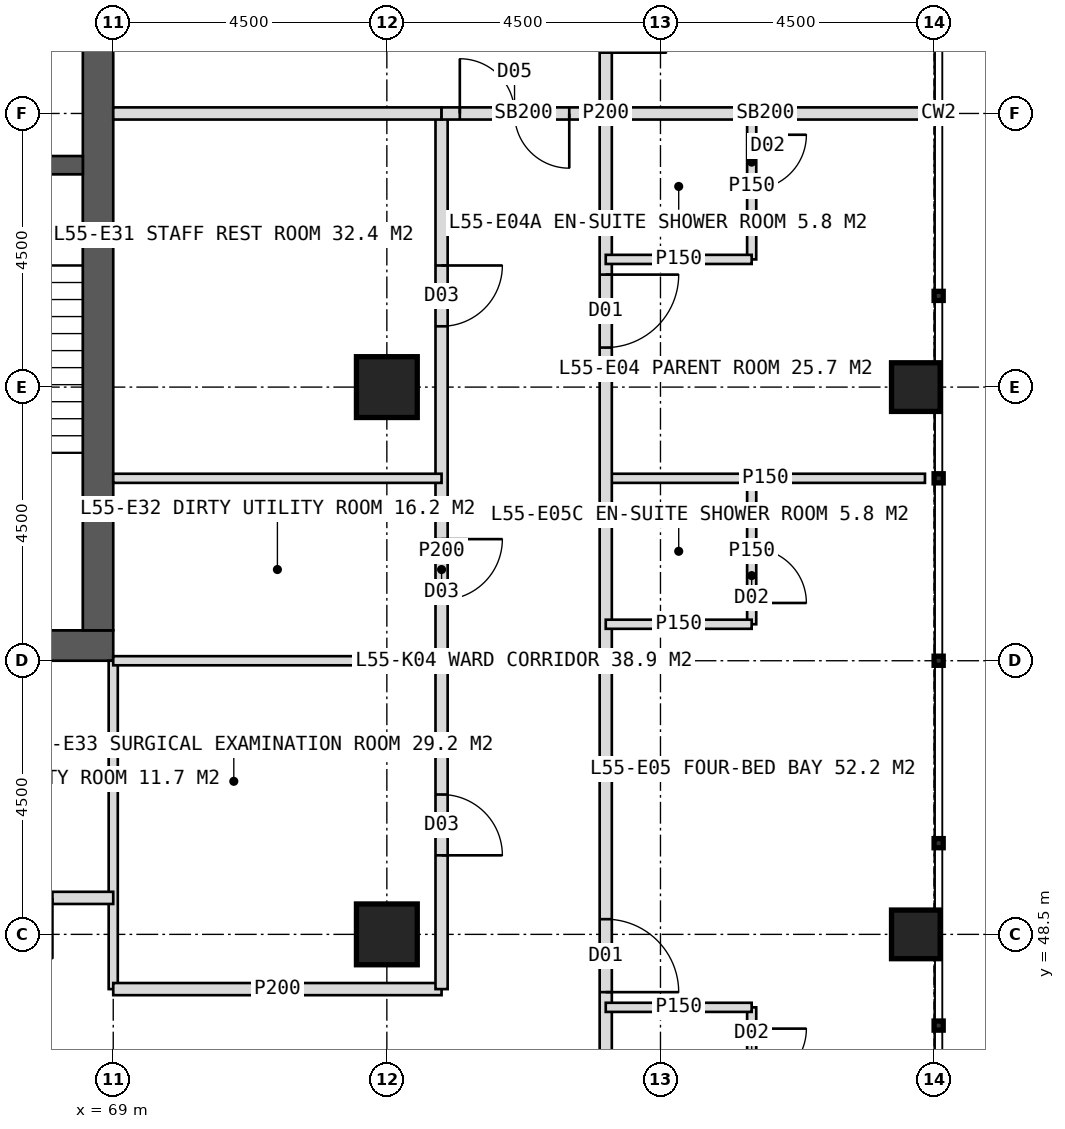
"""IFC4 building model, lengths in metres.
Left out: names, types, materials, properties, quantities, classifications, styles, units other than length and angle.
Written with IfcOpenShell. Run it as: python <this file> out.ifc"""

import sys

from ifc_helpers import new_model, si_unit, direction, frame, frame_2d, origin, origin_2d, place, context, subcontext, project, spatial, rectangle, hollow_rectangle, extrude, element, fill, save


model = new_model("IFC4")
c1 = context("Model", 3, precision=1e-05, world=origin(), true_north=direction((0.0, 1.0)))
c2 = subcontext(c1, "Body", "Model", "MODEL_VIEW")
j1 = project(units=[si_unit("LENGTHUNIT", "METRE"), si_unit("PLANEANGLEUNIT", "RADIAN")], contexts=[c1])
p1 = place(None, origin())
s1 = spatial("IfcSite", under=j1, at=p1, CompositionType="ELEMENT")
p2 = place(p1, origin())
s2 = spatial("IfcBuilding", under=s1, at=p2, CompositionType="ELEMENT")
p3 = place(p2, frame((0.0, 0.0, 229.0)))
s3 = spatial("IfcBuildingStorey", under=s2, at=p3, CompositionType="ELEMENT", Elevation=229.0)
p4 = place(p3, frame((51.0, 53.25, 0.0), z_axis=(0.0, 0.0, 1.0), x_axis=(1.0, 0.0, 0.0)))
e1 = element("IfcWall", 1, at=p4, inside=s3, PredefinedType="SHEAR", context=c2, shape_type="SweptSolid", body=[
    extrude(rectangle(XDim=18.0, YDim=0.5, at=frame_2d((9.0, 0.0))), origin(), (0.0, 0.0, 1.0), 4.0),
])
p5 = place(p4, frame((8.1, 0.0, 0.0)))
e2 = element("IfcOpeningElement", 2, at=p5, cuts=e1, PredefinedType="OPENING", context=c2, shape_type="SweptSolid", body=[
    extrude(rectangle(XDim=1.8, YDim=2.2, at=frame_2d((0.9, 1.1))), frame((0.0, 0.26, 0.0), z_axis=(0.0, -1.0, 0.0), x_axis=(1.0, 0.0, 0.0)), (0.0, 0.0, 1.0), 0.52),
])
p6 = place(p3, frame((68.75, 53.5, 0.0), z_axis=(0.0, 0.0, 1.0), x_axis=(0.0, 1.0, 0.0)))
e3 = element("IfcWall", 3, at=p6, inside=s3, PredefinedType="SHEAR", context=c2, shape_type="SweptSolid", body=[
    extrude(rectangle(XDim=17.0, YDim=0.5, at=frame_2d((8.5, 0.0))), origin(), (0.0, 0.0, 1.0), 4.0),
])
p7 = place(p6, frame((9.6, 0.0, 0.0)))
e4 = element("IfcOpeningElement", 4, at=p7, cuts=e3, PredefinedType="OPENING", context=c2, shape_type="SweptSolid", body=[
    extrude(rectangle(XDim=1.5, YDim=2.2, at=frame_2d((0.75, 1.1))), frame((0.0, 0.26, 0.0), z_axis=(0.0, -1.0, 0.0), x_axis=(1.0, 0.0, 0.0)), (0.0, 0.0, 1.0), 0.52),
])
p8 = place(p3, frame((65.2, 61.15, 0.0), z_axis=(0.0, 0.0, 1.0), x_axis=(1.0, 0.0, 0.0)))
e5 = element("IfcWall", 5, at=p8, inside=s3, PredefinedType="SHEAR", context=c2, shape_type="SweptSolid", body=[
    extrude(rectangle(XDim=3.3, YDim=0.3, at=frame_2d((1.65, 0.0))), origin(), (0.0, 0.0, 1.0), 4.0),
])
p9 = place(p8, frame((1.05, 0.0, 0.0)))
e6 = element("IfcOpeningElement", 6, at=p9, cuts=e5, PredefinedType="OPENING", context=c2, shape_type="SweptSolid", body=[
    extrude(rectangle(XDim=1.2, YDim=2.1, at=frame_2d((0.6, 1.05))), frame((0.0, 0.16, 0.0), z_axis=(0.0, -1.0, 0.0), x_axis=(1.0, 0.0, 0.0)), (0.0, 0.0, 1.0), 0.32),
])
for number, where, z_axis, x_axis in (
    (7, (73.5, 48.5, 0.0), (0.0, 0.0, 1.0), (1.0, 0.0, 0.0)),
    (8, (73.5, 57.5, 0.0), (0.0, 0.0, 1.0), (1.0, 0.0, 0.0)),
):
    element("IfcColumn", number, at=place(p3, frame(where, z_axis=z_axis, x_axis=x_axis)), inside=s3, PredefinedType="COLUMN", context=c2, shape_type="SweptSolid", body=[
        extrude(hollow_rectangle(XDim=1.0, YDim=1.0, WallThickness=0.1, at=origin_2d()), origin(), (0.0, 0.0, 1.0), 4.0),
    ])
for number, where, z_axis, x_axis in (
    (9, (82.2, 48.5, 0.0), (0.0, 0.0, 1.0), (1.0, 0.0, 0.0)),
    (10, (82.2, 57.5, 0.0), (0.0, 0.0, 1.0), (1.0, 0.0, 0.0)),
):
    element("IfcColumn", number, at=place(p3, frame(where, z_axis=z_axis, x_axis=x_axis)), inside=s3, PredefinedType="COLUMN", context=c2, shape_type="SweptSolid", body=[
        extrude(hollow_rectangle(XDim=0.8, YDim=0.8, WallThickness=0.08, at=origin_2d()), origin(), (0.0, 0.0, 1.0), 4.0),
    ])
p10 = place(p3, frame((69.0, 53.0, 0.0), z_axis=(0.0, 0.0, 1.0), x_axis=(0.0, -1.0, 0.0)))
e11 = element("IfcWall", 11, at=p10, inside=s3, PredefinedType="PARTITIONING", context=c2, shape_type="SweptSolid", body=[
    extrude(rectangle(XDim=5.4, YDim=0.15, at=frame_2d((2.7, 0.0))), origin(), (0.0, 0.0, 1.0), 3.75),
])
p11 = place(p3, frame((74.4, 47.6, 0.0), z_axis=(0.0, 0.0, 1.0), x_axis=(-1.0, 0.0, 0.0)))
e12 = element("IfcWall", 12, at=p11, inside=s3, PredefinedType="PARTITIONING", context=c2, shape_type="SweptSolid", body=[
    extrude(rectangle(XDim=5.4, YDim=0.2, at=frame_2d((2.7, 0.0))), origin(), (0.0, 0.0, 1.0), 3.75),
])
p12 = place(p3, frame((69.0, 49.1, 0.0), z_axis=(0.0, 0.0, 1.0), x_axis=(-1.0, 0.0, 0.0)))
e13 = element("IfcWall", 13, at=p12, inside=s3, PredefinedType="PARTITIONING", context=c2, shape_type="SweptSolid", body=[
    extrude(rectangle(XDim=6.75, YDim=0.2, at=frame_2d((3.375, 0.0))), origin(), (0.0, 0.0, 1.0), 3.75),
])
p13 = place(p12, frame((1.0, 0.0, 0.0)))
e14 = element("IfcOpeningElement", 14, at=p13, cuts=e13, PredefinedType="OPENING", context=c2, shape_type="SweptSolid", body=[
    extrude(rectangle(XDim=1.0, YDim=2.1, at=frame_2d((0.5, 1.05))), frame((0.0, 0.11, 0.0), z_axis=(0.0, -1.0, 0.0), x_axis=(1.0, 0.0, 0.0)), (0.0, 0.0, 1.0), 0.22),
])
p14 = place(p12, frame((5.425, 0.0, 0.0)))
e15 = element("IfcOpeningElement", 15, at=p14, cuts=e13, PredefinedType="OPENING", context=c2, shape_type="SweptSolid", body=[
    extrude(rectangle(XDim=1.0, YDim=2.1, at=frame_2d((0.5, 1.05))), frame((0.0, 0.11, 0.0), z_axis=(0.0, -1.0, 0.0), x_axis=(1.0, 0.0, 0.0)), (0.0, 0.0, 1.0), 0.22),
])
p15 = place(p3, frame((77.1, 62.0, 0.0), z_axis=(0.0, 0.0, 1.0), x_axis=(1.0, 0.0, 0.0)))
e16 = element("IfcWall", 16, at=p15, inside=s3, PredefinedType="SOLIDWALL", context=c2, shape_type="SweptSolid", body=[
    extrude(rectangle(XDim=5.25, YDim=0.2, at=frame_2d((2.625, 0.0))), origin(), (0.0, 0.0, 1.0), 2.95),
])
p16 = place(p3, frame((77.1, 56.0, 0.0), z_axis=(0.0, 0.0, 1.0), x_axis=(1.0, 0.0, 0.0)))
e17 = element("IfcWall", 17, at=p16, inside=s3, PredefinedType="PARTITIONING", context=c2, shape_type="SweptSolid", body=[
    extrude(rectangle(XDim=5.25, YDim=0.15, at=frame_2d((2.625, 0.0))), origin(), (0.0, 0.0, 1.0), 3.75),
])
p17 = place(p3, frame((77.1, 79.1, 0.0), z_axis=(0.0, 0.0, 1.0), x_axis=(0.0, -1.0, 0.0)))
e18 = element("IfcWall", 18, at=p17, inside=s3, PredefinedType="PARTITIONING", context=c2, shape_type="SweptSolid", body=[
    extrude(rectangle(XDim=34.2, YDim=0.2, at=frame_2d((17.1, 0.0))), origin(), (0.0, 0.0, 1.0), 3.75),
])
p18 = place(p17, frame((3.65, 0.0, 0.0)))
e19 = element("IfcOpeningElement", 19, at=p18, cuts=e18, PredefinedType="OPENING", context=c2, shape_type="SweptSolid", body=[
    extrude(rectangle(XDim=1.2, YDim=2.2, at=frame_2d((0.6, 1.1))), frame((0.0, 0.11, 0.0), z_axis=(0.0, -1.0, 0.0), x_axis=(1.0, 0.0, 0.0)), (0.0, 0.0, 1.0), 0.22),
])
p19 = place(p17, frame((10.75, 0.0, 0.0)))
e20 = element("IfcOpeningElement", 20, at=p19, cuts=e18, PredefinedType="OPENING", context=c2, shape_type="SweptSolid", body=[
    extrude(rectangle(XDim=1.2, YDim=2.2, at=frame_2d((0.6, 1.1))), frame((0.0, 0.11, 0.0), z_axis=(0.0, -1.0, 0.0), x_axis=(1.0, 0.0, 0.0)), (0.0, 0.0, 1.0), 0.22),
])
p20 = place(p17, frame((15.1, 0.0, 0.0)))
e21 = element("IfcOpeningElement", 21, at=p20, cuts=e18, PredefinedType="OPENING", context=c2, shape_type="SweptSolid", body=[
    extrude(rectangle(XDim=1.0, YDim=2.1, at=frame_2d((0.5, 1.05))), frame((0.0, 0.11, 0.0), z_axis=(0.0, -1.0, 0.0), x_axis=(1.0, 0.0, 0.0)), (0.0, 0.0, 1.0), 0.22),
])
p21 = place(p17, frame((19.75, 0.0, 0.0)))
e22 = element("IfcOpeningElement", 22, at=p21, cuts=e18, PredefinedType="OPENING", context=c2, shape_type="SweptSolid", body=[
    extrude(rectangle(XDim=1.2, YDim=2.2, at=frame_2d((0.6, 1.1))), frame((0.0, 0.11, 0.0), z_axis=(0.0, -1.0, 0.0), x_axis=(1.0, 0.0, 0.0)), (0.0, 0.0, 1.0), 0.22),
])
p22 = place(p17, frame((30.35, 0.0, 0.0)))
e23 = element("IfcOpeningElement", 23, at=p22, cuts=e18, PredefinedType="OPENING", context=c2, shape_type="SweptSolid", body=[
    extrude(rectangle(XDim=1.2, YDim=2.2, at=frame_2d((0.6, 1.1))), frame((0.0, 0.11, 0.0), z_axis=(0.0, -1.0, 0.0), x_axis=(1.0, 0.0, 0.0)), (0.0, 0.0, 1.0), 0.22),
])
p23 = place(p3, frame((79.5, 62.0, 0.0), z_axis=(0.0, 0.0, 1.0), x_axis=(0.0, -1.0, 0.0)))
e24 = element("IfcWall", 24, at=p23, inside=s3, PredefinedType="PARTITIONING", context=c2, shape_type="SweptSolid", body=[
    extrude(rectangle(XDim=2.4, YDim=0.15, at=frame_2d((1.2, 0.0))), origin(), (0.0, 0.0, 1.0), 3.75),
])
p24 = place(p23, frame((0.35, 0.0, 0.0)))
e25 = element("IfcOpeningElement", 25, at=p24, cuts=e24, PredefinedType="OPENING", context=c2, shape_type="SweptSolid", body=[
    extrude(rectangle(XDim=0.9, YDim=2.1, at=frame_2d((0.45, 1.05))), frame((0.0, 0.085, 0.0), z_axis=(0.0, -1.0, 0.0), x_axis=(1.0, 0.0, 0.0)), (0.0, 0.0, 1.0), 0.17),
])
p25 = place(p3, frame((77.1, 59.6, 0.0), z_axis=(0.0, 0.0, 1.0), x_axis=(1.0, 0.0, 0.0)))
e26 = element("IfcWall", 26, at=p25, inside=s3, PredefinedType="PARTITIONING", context=c2, shape_type="SweptSolid", body=[
    extrude(rectangle(XDim=2.4, YDim=0.15, at=frame_2d((1.2, 0.0))), origin(), (0.0, 0.0, 1.0), 3.75),
])
p26 = place(p3, frame((79.5, 47.3, 0.0), z_axis=(0.0, 0.0, 1.0), x_axis=(0.0, -1.0, 0.0)))
e27 = element("IfcWall", 27, at=p26, inside=s3, PredefinedType="PARTITIONING", context=c2, shape_type="SweptSolid", body=[
    extrude(rectangle(XDim=2.4, YDim=0.15, at=frame_2d((1.2, 0.0))), origin(), (0.0, 0.0, 1.0), 3.75),
])
p27 = place(p26, frame((0.35, 0.0, 0.0)))
e28 = element("IfcOpeningElement", 28, at=p27, cuts=e27, PredefinedType="OPENING", context=c2, shape_type="SweptSolid", body=[
    extrude(rectangle(XDim=0.9, YDim=2.1, at=frame_2d((0.45, 1.05))), frame((0.0, 0.085, 0.0), z_axis=(0.0, -1.0, 0.0), x_axis=(1.0, 0.0, 0.0)), (0.0, 0.0, 1.0), 0.17),
])
p28 = place(p3, frame((77.1, 47.3, 0.0), z_axis=(0.0, 0.0, 1.0), x_axis=(1.0, 0.0, 0.0)))
e29 = element("IfcWall", 29, at=p28, inside=s3, PredefinedType="PARTITIONING", context=c2, shape_type="SweptSolid", body=[
    extrude(rectangle(XDim=2.4, YDim=0.15, at=frame_2d((1.2, 0.0))), origin(), (0.0, 0.0, 1.0), 3.75),
])
p29 = place(p3, frame((79.5, 56.0, 0.0), z_axis=(0.0, 0.0, 1.0), x_axis=(0.0, -1.0, 0.0)))
e30 = element("IfcWall", 30, at=p29, inside=s3, PredefinedType="PARTITIONING", context=c2, shape_type="SweptSolid", body=[
    extrude(rectangle(XDim=2.4, YDim=0.15, at=frame_2d((1.2, 0.0))), origin(), (0.0, 0.0, 1.0), 3.75),
])
p30 = place(p29, frame((1.15, 0.0, 0.0)))
e31 = element("IfcOpeningElement", 31, at=p30, cuts=e30, PredefinedType="OPENING", context=c2, shape_type="SweptSolid", body=[
    extrude(rectangle(XDim=0.9, YDim=2.1, at=frame_2d((0.45, 1.05))), frame((0.0, 0.085, 0.0), z_axis=(0.0, -1.0, 0.0), x_axis=(1.0, 0.0, 0.0)), (0.0, 0.0, 1.0), 0.17),
])
p31 = place(p3, frame((77.1, 53.6, 0.0), z_axis=(0.0, 0.0, 1.0), x_axis=(1.0, 0.0, 0.0)))
e32 = element("IfcWall", 32, at=p31, inside=s3, PredefinedType="PARTITIONING", context=c2, shape_type="SweptSolid", body=[
    extrude(rectangle(XDim=2.4, YDim=0.15, at=frame_2d((1.2, 0.0))), origin(), (0.0, 0.0, 1.0), 3.75),
])
p32 = place(p3, frame((74.4, 62.0, 0.0), z_axis=(0.0, 0.0, 1.0), x_axis=(0.0, -1.0, 0.0)))
e33 = element("IfcWall", 33, at=p32, inside=s3, PredefinedType="PARTITIONING", context=c2, shape_type="SweptSolid", body=[
    extrude(rectangle(XDim=14.4, YDim=0.2, at=frame_2d((7.2, 0.0))), origin(), (0.0, 0.0, 1.0), 3.75),
])
p33 = place(p32, frame((2.5, 0.0, 0.0)))
e34 = element("IfcOpeningElement", 34, at=p33, cuts=e33, PredefinedType="OPENING", context=c2, shape_type="SweptSolid", body=[
    extrude(rectangle(XDim=1.0, YDim=2.1, at=frame_2d((0.5, 1.05))), frame((0.0, 0.11, 0.0), z_axis=(0.0, -1.0, 0.0), x_axis=(1.0, 0.0, 0.0)), (0.0, 0.0, 1.0), 0.22),
])
p34 = place(p32, frame((7.0, 0.0, 0.0)))
e35 = element("IfcOpeningElement", 35, at=p34, cuts=e33, PredefinedType="OPENING", context=c2, shape_type="SweptSolid", body=[
    extrude(rectangle(XDim=1.0, YDim=2.1, at=frame_2d((0.5, 1.05))), frame((0.0, 0.11, 0.0), z_axis=(0.0, -1.0, 0.0), x_axis=(1.0, 0.0, 0.0)), (0.0, 0.0, 1.0), 0.22),
])
p35 = place(p32, frame((11.2, 0.0, 0.0)))
e36 = element("IfcOpeningElement", 36, at=p35, cuts=e33, PredefinedType="OPENING", context=c2, shape_type="SweptSolid", body=[
    extrude(rectangle(XDim=1.0, YDim=2.1, at=frame_2d((0.5, 1.05))), frame((0.0, 0.11, 0.0), z_axis=(0.0, -1.0, 0.0), x_axis=(1.0, 0.0, 0.0)), (0.0, 0.0, 1.0), 0.22),
])
p36 = place(p3, frame((69.0, 62.0, 0.0), z_axis=(0.0, 0.0, 1.0), x_axis=(1.0, 0.0, 0.0)))
e37 = element("IfcWall", 37, at=p36, inside=s3, PredefinedType="SOLIDWALL", context=c2, shape_type="SweptSolid", body=[
    extrude(rectangle(XDim=5.4, YDim=0.2, at=frame_2d((2.7, 0.0))), origin(), (0.0, 0.0, 1.0), 2.95),
])
for number, where, z_axis, x_axis in (
    (38, (69.0, 56.0, 0.0), (0.0, 0.0, 1.0), (1.0, 0.0, 0.0)),
    (39, (69.0, 53.0, 0.0), (0.0, 0.0, 1.0), (1.0, 0.0, 0.0)),
):
    element("IfcWall", number, at=place(p3, frame(where, z_axis=z_axis, x_axis=x_axis)), inside=s3, PredefinedType="PARTITIONING", context=c2, shape_type="SweptSolid", body=[
        extrude(rectangle(XDim=5.4, YDim=0.15, at=frame_2d((2.7, 0.0))), origin(), (0.0, 0.0, 1.0), 3.75),
    ])
p37 = place(p3, frame((74.4, 62.0, 0.0), z_axis=(0.0, 0.0, 1.0), x_axis=(1.0, 0.0, 0.0)))
e40 = element("IfcWall", 40, at=p37, inside=s3, PredefinedType="SOLIDWALL", context=c2, shape_type="SweptSolid", body=[
    extrude(rectangle(XDim=2.7, YDim=0.2, at=frame_2d((1.35, 0.0))), origin(), (0.0, 0.0, 1.0), 2.95),
])
p38 = place(p37, frame((0.3, 0.0, 0.0)))
e41 = element("IfcOpeningElement", 41, at=p38, cuts=e40, PredefinedType="OPENING", context=c2, shape_type="SweptSolid", body=[
    extrude(rectangle(XDim=1.8, YDim=2.2, at=frame_2d((0.9, 1.1))), frame((0.0, 0.11, 0.0), z_axis=(0.0, -1.0, 0.0), x_axis=(1.0, 0.0, 0.0)), (0.0, 0.0, 1.0), 0.22),
])
p39 = place(p21, origin())
e42 = element("IfcDoor", 42, at=p39, inside=s3, OperationType="SINGLE_SWING_LEFT", PredefinedType="DOOR", context=c2, shape_type="SweptSolid", body=[
    extrude(rectangle(XDim=1.2, YDim=2.2, at=frame_2d((0.6, 1.1))), frame((0.0, 0.025, 0.0), z_axis=(0.0, -1.0, 0.0), x_axis=(1.0, 0.0, 0.0)), (0.0, 0.0, 1.0), 0.05),
])
fill(e22, e42)
p40 = place(p24, origin())
e43 = element("IfcDoor", 43, at=p40, inside=s3, OperationType="SINGLE_SWING_LEFT", PredefinedType="DOOR", context=c2, shape_type="SweptSolid", body=[
    extrude(rectangle(XDim=0.9, YDim=2.1, at=frame_2d((0.45, 1.05))), frame((0.0, 0.025, 0.0), z_axis=(0.0, -1.0, 0.0), x_axis=(1.0, 0.0, 0.0)), (0.0, 0.0, 1.0), 0.05),
])
fill(e25, e43)
p41 = place(p22, origin())
e44 = element("IfcDoor", 44, at=p41, inside=s3, OperationType="SINGLE_SWING_RIGHT", PredefinedType="DOOR", context=c2, shape_type="SweptSolid", body=[
    extrude(rectangle(XDim=1.2, YDim=2.2, at=frame_2d((0.6, 1.1))), frame((0.0, 0.025, 0.0), z_axis=(0.0, -1.0, 0.0), x_axis=(1.0, 0.0, 0.0)), (0.0, 0.0, 1.0), 0.05),
])
fill(e23, e44)
p42 = place(p27, origin())
e45 = element("IfcDoor", 45, at=p42, inside=s3, OperationType="SINGLE_SWING_LEFT", PredefinedType="DOOR", context=c2, shape_type="SweptSolid", body=[
    extrude(rectangle(XDim=0.9, YDim=2.1, at=frame_2d((0.45, 1.05))), frame((0.0, 0.025, 0.0), z_axis=(0.0, -1.0, 0.0), x_axis=(1.0, 0.0, 0.0)), (0.0, 0.0, 1.0), 0.05),
])
fill(e28, e45)
p43 = place(p30, origin())
e46 = element("IfcDoor", 46, at=p43, inside=s3, OperationType="SINGLE_SWING_RIGHT", PredefinedType="DOOR", context=c2, shape_type="SweptSolid", body=[
    extrude(rectangle(XDim=0.9, YDim=2.1, at=frame_2d((0.45, 1.05))), frame((0.0, 0.025, 0.0), z_axis=(0.0, -1.0, 0.0), x_axis=(1.0, 0.0, 0.0)), (0.0, 0.0, 1.0), 0.05),
])
fill(e31, e46)
p44 = place(p33, origin())
e47 = element("IfcDoor", 47, at=p44, inside=s3, OperationType="SINGLE_SWING_LEFT", PredefinedType="DOOR", context=c2, shape_type="SweptSolid", body=[
    extrude(rectangle(XDim=1.0, YDim=2.1, at=frame_2d((0.5, 1.05))), frame((0.0, 0.025, 0.0), z_axis=(0.0, -1.0, 0.0), x_axis=(1.0, 0.0, 0.0)), (0.0, 0.0, 1.0), 0.05),
])
fill(e34, e47)
p45 = place(p34, origin())
e48 = element("IfcDoor", 48, at=p45, inside=s3, OperationType="SINGLE_SWING_LEFT", PredefinedType="DOOR", context=c2, shape_type="SweptSolid", body=[
    extrude(rectangle(XDim=1.0, YDim=2.1, at=frame_2d((0.5, 1.05))), frame((0.0, 0.025, 0.0), z_axis=(0.0, -1.0, 0.0), x_axis=(1.0, 0.0, 0.0)), (0.0, 0.0, 1.0), 0.05),
])
fill(e35, e48)
p46 = place(p35, origin())
e49 = element("IfcDoor", 49, at=p46, inside=s3, OperationType="SINGLE_SWING_RIGHT", PredefinedType="DOOR", context=c2, shape_type="SweptSolid", body=[
    extrude(rectangle(XDim=1.0, YDim=2.1, at=frame_2d((0.5, 1.05))), frame((0.0, 0.025, 0.0), z_axis=(0.0, -1.0, 0.0), x_axis=(1.0, 0.0, 0.0)), (0.0, 0.0, 1.0), 0.05),
])
fill(e36, e49)
p47 = place(p38, origin())
e50 = element("IfcDoor", 50, at=p47, inside=s3, OperationType="DOUBLE_DOOR_DOUBLE_SWING", PredefinedType="DOOR", context=c2, shape_type="SweptSolid", body=[
    extrude(rectangle(XDim=1.8, YDim=2.2, at=frame_2d((0.9, 1.1))), frame((0.0, 0.025, 0.0), z_axis=(0.0, -1.0, 0.0), x_axis=(1.0, 0.0, 0.0)), (0.0, 0.0, 1.0), 0.05),
])
fill(e41, e50)
save(model, sys.argv[1])
